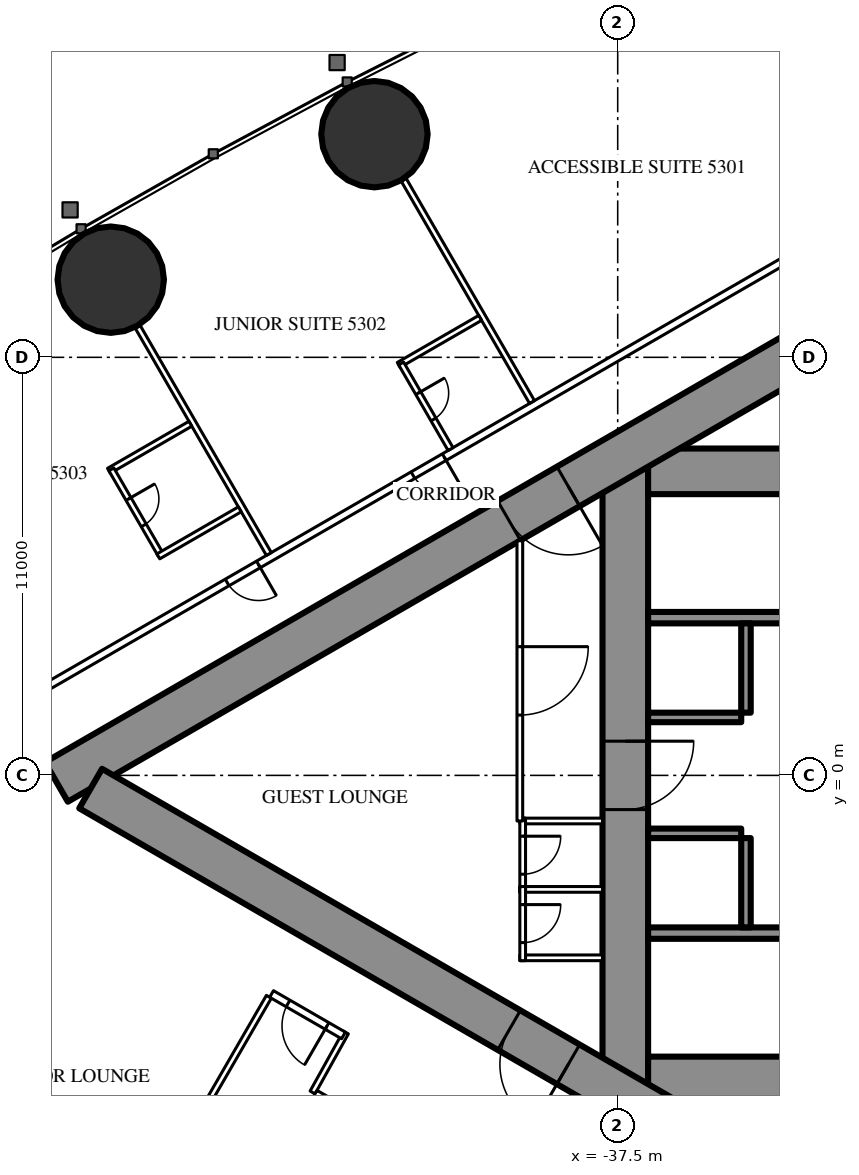
"""IFC4 building model, lengths in metres.
Left out: names, types, materials, properties, quantities, classifications, styles, units other than length and angle.
Written with IfcOpenShell. Run it as: python <this file> out.ifc"""

import sys

from ifc_helpers import new_model, si_unit, direction, frame, frame_2d, origin, origin_2d, place, context, subcontext, project, spatial, rectangle, circle, extrude, element, fill, save


model = new_model("IFC4")
c1 = context("Model", 3, precision=1e-05, world=origin(), true_north=direction((0.0, 1.0)))
c2 = subcontext(c1, "Body", "Model", "MODEL_VIEW")
j1 = project(units=[si_unit("LENGTHUNIT", "METRE"), si_unit("PLANEANGLEUNIT", "RADIAN")], contexts=[c1])
p1 = place(None, origin())
s1 = spatial("IfcSite", under=j1, at=p1, CompositionType="ELEMENT")
p2 = place(p1, origin())
s2 = spatial("IfcBuilding", under=s1, at=p2, CompositionType="ELEMENT")
p3 = place(p2, frame((0.0, 0.0, 198.3)))
s3 = spatial("IfcBuildingStorey", under=s2, at=p3, CompositionType="ELEMENT", Elevation=198.3)
for number, where, z_axis, x_axis in (
    (1, (-43.9, 16.871, 0.0), (0.0, 0.0, 1.0), (1.0, 0.0, 0.0)),
    (2, (-50.839, 13.043, 0.0), (0.0, 0.0, 1.0), (1.0, 0.0, 0.0)),
):
    element("IfcColumn", number, at=place(p3, frame(where, z_axis=z_axis, x_axis=x_axis)), inside=s3, PredefinedType="COLUMN", context=c2, shape_type="SweptSolid", body=[
        extrude(circle(Radius=1.4, at=origin_2d()), origin(), (0.0, 0.0, 1.0), 3.5),
    ])
p4 = place(p3, frame((-37.3, 8.6, 0.0), z_axis=(0.0, 0.0, 1.0), x_axis=(0.0, -1.0, 0.0)))
e3 = element("IfcWall", 3, at=p4, inside=s3, PredefinedType="SHEAR", context=c2, shape_type="SweptSolid", body=[
    extrude(rectangle(XDim=17.2, YDim=1.2, at=frame_2d((8.6, 0.0))), origin(), (0.0, 0.0, 1.0), 3.5),
])
p5 = place(p4, frame((7.7, 0.0, 0.0)))
e4 = element("IfcOpeningElement", 4, at=p5, cuts=e3, PredefinedType="OPENING", context=c2, shape_type="SweptSolid", body=[
    extrude(rectangle(XDim=1.8, YDim=2.2, at=frame_2d((0.9, 1.1))), frame((0.0, 0.61, 0.0), z_axis=(0.0, -1.0, 0.0), x_axis=(1.0, 0.0, 0.0)), (0.0, 0.0, 1.0), 1.22),
])
p6 = place(p3, frame((-28.3, 8.0, 0.0), z_axis=(0.0, 0.0, 1.0), x_axis=(-1.0, 0.0, 0.0)))
e5 = element("IfcWall", 5, at=p6, inside=s3, PredefinedType="SHEAR", context=c2, shape_type="SweptSolid", body=[
    extrude(rectangle(XDim=8.4, YDim=1.2, at=frame_2d((4.2, 0.0))), origin(), (0.0, 0.0, 1.0), 3.5),
])
p7 = place(p6, frame((0.25, 0.0, 0.0)))
e6 = element("IfcOpeningElement", 6, at=p7, cuts=e5, PredefinedType="OPENING", context=c2, shape_type="SweptSolid", body=[
    extrude(rectangle(XDim=1.0, YDim=2.2, at=frame_2d((0.5, 1.1))), frame((0.0, 0.61, 0.0), z_axis=(0.0, -1.0, 0.0), x_axis=(1.0, 0.0, 0.0)), (0.0, 0.0, 1.0), 1.22),
])
p8 = place(p3, frame((-28.3, -8.0, 0.0), z_axis=(0.0, 0.0, 1.0), x_axis=(-1.0, 0.0, 0.0)))
e7 = element("IfcWall", 7, at=p8, inside=s3, PredefinedType="SHEAR", context=c2, shape_type="SweptSolid", body=[
    extrude(rectangle(XDim=8.4, YDim=1.2, at=frame_2d((4.2, 0.0))), origin(), (0.0, 0.0, 1.0), 3.5),
])
p9 = place(p8, frame((0.25, 0.0, 0.0)))
e8 = element("IfcOpeningElement", 8, at=p9, cuts=e7, PredefinedType="OPENING", context=c2, shape_type="SweptSolid", body=[
    extrude(rectangle(XDim=1.0, YDim=2.2, at=frame_2d((0.5, 1.1))), frame((0.0, 0.61, 0.0), z_axis=(0.0, -1.0, 0.0), x_axis=(1.0, 0.0, 0.0)), (0.0, 0.0, 1.0), 1.22),
])
for number, where, z_axis, x_axis in (
    (9, (-28.3, 4.15, 0.0), (0.0, 0.0, 1.0), (-1.0, 0.0, 0.0)),
    (10, (-28.3, -4.15, 0.0), (0.0, 0.0, 1.0), (-1.0, 0.0, 0.0)),
):
    element("IfcWall", number, at=place(p3, frame(where, z_axis=z_axis, x_axis=x_axis)), inside=s3, PredefinedType="SHEAR", context=c2, shape_type="SweptSolid", body=[
        extrude(rectangle(XDim=8.4, YDim=0.3, at=frame_2d((4.2, 0.0))), origin(), (0.0, 0.0, 1.0), 3.5),
    ])
p10 = place(p3, frame((-34.125, 4.0, 0.0), z_axis=(0.0, 0.0, 1.0), x_axis=(0.0, -1.0, 0.0)))
e11 = element("IfcWall", 11, at=p10, inside=s3, PredefinedType="SHEAR", context=c2, shape_type="SweptSolid", body=[
    extrude(rectangle(XDim=2.35, YDim=0.25, at=frame_2d((1.175, 0.0))), origin(), (0.0, 0.0, 1.0), 3.5),
])
p11 = place(p3, frame((-34.25, 1.525, 0.0), z_axis=(0.0, 0.0, 1.0), x_axis=(-1.0, 0.0, 0.0)))
e12 = element("IfcWall", 12, at=p11, inside=s3, PredefinedType="SHEAR", context=c2, shape_type="SweptSolid", body=[
    extrude(rectangle(XDim=2.45, YDim=0.25, at=frame_2d((1.225, 0.0))), origin(), (0.0, 0.0, 1.0), 3.5),
])
p12 = place(p3, frame((-34.125, -1.65, 0.0), z_axis=(0.0, 0.0, 1.0), x_axis=(0.0, -1.0, 0.0)))
e13 = element("IfcWall", 13, at=p12, inside=s3, PredefinedType="SHEAR", context=c2, shape_type="SweptSolid", body=[
    extrude(rectangle(XDim=2.35, YDim=0.25, at=frame_2d((1.175, 0.0))), origin(), (0.0, 0.0, 1.0), 3.5),
])
p13 = place(p3, frame((-34.25, -1.525, 0.0), z_axis=(0.0, 0.0, 1.0), x_axis=(-1.0, 0.0, 0.0)))
e14 = element("IfcWall", 14, at=p13, inside=s3, PredefinedType="SHEAR", context=c2, shape_type="SweptSolid", body=[
    extrude(rectangle(XDim=2.45, YDim=0.25, at=frame_2d((1.225, 0.0))), origin(), (0.0, 0.0, 1.0), 3.5),
])
p14 = place(p3, frame((-27.2, 14.3, 0.0), z_axis=(0.0, 0.0, 1.0), x_axis=(-0.866026593062, -0.499997940104, 0.0)))
e15 = element("IfcWall", 15, at=p14, inside=s3, PredefinedType="SHEAR", context=c2, shape_type="SweptSolid", body=[
    extrude(rectangle(XDim=28.946, YDim=1.2, at=frame_2d((14.473, 0.0))), origin(), (0.0, 0.0, 1.0), 3.5),
])
p15 = place(p14, frame((4.6, 0.0, 0.0)))
e16 = element("IfcOpeningElement", 16, at=p15, cuts=e15, PredefinedType="OPENING", context=c2, shape_type="SweptSolid", body=[
    extrude(rectangle(XDim=1.0, YDim=2.2, at=frame_2d((0.5, 1.1))), frame((0.0, 0.61, 0.0), z_axis=(0.0, -1.0, 0.0), x_axis=(1.0, 0.0, 0.0)), (0.0, 0.0, 1.0), 1.22),
])
p16 = place(p14, frame((13.395, 0.0, 0.0)))
e17 = element("IfcOpeningElement", 17, at=p16, cuts=e15, PredefinedType="OPENING", context=c2, shape_type="SweptSolid", body=[
    extrude(rectangle(XDim=1.8, YDim=2.2, at=frame_2d((0.9, 1.1))), frame((0.0, 0.61, 0.0), z_axis=(0.0, -1.0, 0.0), x_axis=(1.0, 0.0, 0.0)), (0.0, 0.0, 1.0), 1.22),
])
p17 = place(p3, frame((-27.2, -14.3, 0.0), z_axis=(0.0, 0.0, 1.0), x_axis=(-0.866024021859, 0.500002393557, 0.0)))
e18 = element("IfcWall", 18, at=p17, inside=s3, PredefinedType="SHEAR", context=c2, shape_type="SweptSolid", body=[
    extrude(rectangle(XDim=27.907, YDim=1.2, at=frame_2d((13.954, 0.0))), origin(), (0.0, 0.0, 1.0), 3.5),
])
p18 = place(p17, frame((4.6, 0.0, 0.0)))
e19 = element("IfcOpeningElement", 19, at=p18, cuts=e18, PredefinedType="OPENING", context=c2, shape_type="SweptSolid", body=[
    extrude(rectangle(XDim=1.0, YDim=2.2, at=frame_2d((0.5, 1.1))), frame((0.0, 0.61, 0.0), z_axis=(0.0, -1.0, 0.0), x_axis=(1.0, 0.0, 0.0)), (0.0, 0.0, 1.0), 1.22),
])
p19 = place(p17, frame((13.395, 0.0, 0.0)))
e20 = element("IfcOpeningElement", 20, at=p19, cuts=e18, PredefinedType="OPENING", context=c2, shape_type="SweptSolid", body=[
    extrude(rectangle(XDim=1.8, YDim=2.2, at=frame_2d((0.9, 1.1))), frame((0.0, 0.61, 0.0), z_axis=(0.0, -1.0, 0.0), x_axis=(1.0, 0.0, 0.0)), (0.0, 0.0, 1.0), 1.22),
])
p20 = place(p3, frame((-27.86, 16.575, 0.0), z_axis=(0.0, 0.0, 1.0), x_axis=(-0.866025533911, -0.499999774615, 0.0)))
e21 = element("IfcWall", 21, at=p20, inside=s3, PredefinedType="PARTITIONING", context=c2, shape_type="SweptSolid", body=[
    extrude(rectangle(XDim=33.149, YDim=0.2, at=frame_2d((16.575, 0.0))), origin(), (0.0, 0.0, 1.0), 3.25),
])
p21 = place(p20, frame((3.75, 0.0, 0.0)))
e22 = element("IfcOpeningElement", 22, at=p21, cuts=e21, PredefinedType="OPENING", context=c2, shape_type="SweptSolid", body=[
    extrude(rectangle(XDim=1.0, YDim=2.2, at=frame_2d((0.5, 1.1))), frame((0.0, 0.11, 0.0), z_axis=(0.0, -1.0, 0.0), x_axis=(1.0, 0.0, 0.0)), (0.0, 0.0, 1.0), 0.22),
])
p22 = place(p20, frame((16.402, 0.0, 0.0)))
e23 = element("IfcOpeningElement", 23, at=p22, cuts=e21, PredefinedType="OPENING", context=c2, shape_type="SweptSolid", body=[
    extrude(rectangle(XDim=0.95, YDim=2.2, at=frame_2d((0.475, 1.1))), frame((0.0, 0.11, 0.0), z_axis=(0.0, -1.0, 0.0), x_axis=(1.0, 0.0, 0.0)), (0.0, 0.0, 1.0), 0.22),
])
p23 = place(p20, frame((22.047, 0.0, 0.0)))
e24 = element("IfcOpeningElement", 24, at=p23, cuts=e21, PredefinedType="OPENING", context=c2, shape_type="SweptSolid", body=[
    extrude(rectangle(XDim=0.95, YDim=2.2, at=frame_2d((0.475, 1.1))), frame((0.0, 0.11, 0.0), z_axis=(0.0, -1.0, 0.0), x_axis=(1.0, 0.0, 0.0)), (0.0, 0.0, 1.0), 0.22),
])
p24 = place(p20, frame((30.396, 0.0, 0.0)))
e25 = element("IfcOpeningElement", 25, at=p24, cuts=e21, PredefinedType="OPENING", context=c2, shape_type="SweptSolid", body=[
    extrude(rectangle(XDim=1.8, YDim=2.2, at=frame_2d((0.9, 1.1))), frame((0.0, 0.11, 0.0), z_axis=(0.0, -1.0, 0.0), x_axis=(1.0, 0.0, 0.0)), (0.0, 0.0, 1.0), 0.22),
])
p25 = place(p3, frame((-39.754, 9.823, 0.0), z_axis=(0.0, 0.0, 1.0), x_axis=(-0.499997670926, 0.866026748472, 0.0)))
e26 = element("IfcWall", 26, at=p25, inside=s3, PredefinedType="PARTITIONING", context=c2, shape_type="SweptSolid", body=[
    extrude(rectangle(XDim=6.757, YDim=0.15, at=frame_2d((3.379, 0.0))), origin(), (0.0, 0.0, 1.0), 2.3),
])
for number, where, z_axis, x_axis in (
    (27, (-46.679, 5.825, 0.0), (0.0, 0.0, 1.0), (-0.5, 0.866, 0.0)),
    (28, (-46.679, -5.825, 0.0), (0.0, 0.0, 1.0), (-0.5, -0.866, 0.0)),
):
    element("IfcWall", number, at=place(p3, frame(where, z_axis=z_axis, x_axis=x_axis)), inside=s3, PredefinedType="PARTITIONING", context=c2, shape_type="SweptSolid", body=[
        extrude(rectangle(XDim=6.911, YDim=0.15, at=frame_2d((3.456, 0.0))), origin(), (0.0, 0.0, 1.0), 2.3),
    ])
p26 = place(p3, frame((-44.652, -6.764, 0.0), z_axis=(0.0, 0.0, 1.0), x_axis=(-0.485424724123, -0.874278466629, 0.0)))
e29 = element("IfcWall", 29, at=p26, inside=s3, PredefinedType="PARTITIONING", context=c2, shape_type="SweptSolid", body=[
    extrude(rectangle(XDim=1.805, YDim=0.15, at=frame_2d((0.903, 0.0))), origin(), (0.0, 0.0, 1.0), 3.25),
])
p27 = place(p3, frame((-44.715, -6.844, 0.0), z_axis=(0.0, 0.0, 1.0), x_axis=(-0.865999496279, 0.500044870432, 0.0)))
e30 = element("IfcWall", 30, at=p27, inside=s3, PredefinedType="PARTITIONING", context=c2, shape_type="SweptSolid", body=[
    extrude(rectangle(XDim=2.185, YDim=0.2, at=frame_2d((1.092, 0.0))), origin(), (0.0, 0.0, 1.0), 3.25),
])
p28 = place(p27, frame((0.5, 0.0, 0.0)))
e31 = element("IfcOpeningElement", 31, at=p28, cuts=e30, PredefinedType="OPENING", context=c2, shape_type="SweptSolid", body=[
    extrude(rectangle(XDim=1.185, YDim=2.2, at=frame_2d((0.593, 1.1))), frame((0.0, 0.11, 0.0), z_axis=(0.0, -1.0, 0.0), x_axis=(1.0, 0.0, 0.0)), (0.0, 0.0, 1.0), 0.22),
])
p29 = place(p3, frame((-41.119, 12.037, 0.0), z_axis=(0.0, 0.0, 1.0), x_axis=(-0.866073894602, -0.499916002032, 0.0)))
e32 = element("IfcWall", 32, at=p29, inside=s3, PredefinedType="PARTITIONING", context=c2, shape_type="SweptSolid", body=[
    extrude(rectangle(XDim=2.475, YDim=0.15, at=frame_2d((1.238, 0.0))), origin(), (0.0, 0.0, 1.0), 3.25),
])
p30 = place(p3, frame((-41.898, 8.585, 0.0), z_axis=(0.0, 0.0, 1.0), x_axis=(-0.500006934395, 0.866021400173, 0.0)))
e33 = element("IfcWall", 33, at=p30, inside=s3, PredefinedType="PARTITIONING", context=c2, shape_type="SweptSolid", body=[
    extrude(rectangle(XDim=2.6, YDim=0.15, at=frame_2d((1.3, 0.0))), origin(), (0.0, 0.0, 1.0), 3.25),
])
p31 = place(p30, frame((0.9, 0.0, 0.0)))
e34 = element("IfcOpeningElement", 34, at=p31, cuts=e33, PredefinedType="OPENING", context=c2, shape_type="SweptSolid", body=[
    extrude(rectangle(XDim=0.8, YDim=2.2, at=frame_2d((0.4, 1.1))), frame((0.0, 0.085, 0.0), z_axis=(0.0, -1.0, 0.0), x_axis=(1.0, 0.0, 0.0)), (0.0, 0.0, 1.0), 0.17),
])
p32 = place(p3, frame((-48.744, 9.252, 0.0), z_axis=(0.0, 0.0, 1.0), x_axis=(-0.866006523861, -0.500032699561, 0.0)))
e35 = element("IfcWall", 35, at=p32, inside=s3, PredefinedType="PARTITIONING", context=c2, shape_type="SweptSolid", body=[
    extrude(rectangle(XDim=2.475, YDim=0.15, at=frame_2d((1.237, 0.0))), origin(), (0.0, 0.0, 1.0), 3.25),
])
p33 = place(p3, frame((-49.522, 5.8, 0.0), z_axis=(0.0, 0.0, 1.0), x_axis=(-0.500006934395, 0.866021400173, 0.0)))
e36 = element("IfcWall", 36, at=p33, inside=s3, PredefinedType="PARTITIONING", context=c2, shape_type="SweptSolid", body=[
    extrude(rectangle(XDim=2.6, YDim=0.15, at=frame_2d((1.3, 0.0))), origin(), (0.0, 0.0, 1.0), 3.25),
])
p34 = place(p33, frame((0.9, 0.0, 0.0)))
e37 = element("IfcOpeningElement", 37, at=p34, cuts=e36, PredefinedType="OPENING", context=c2, shape_type="SweptSolid", body=[
    extrude(rectangle(XDim=0.8, YDim=2.2, at=frame_2d((0.4, 1.1))), frame((0.0, 0.085, 0.0), z_axis=(0.0, -1.0, 0.0), x_axis=(1.0, 0.0, 0.0)), (0.0, 0.0, 1.0), 0.17),
])
p35 = place(p3, frame((-47.444, 7.0, 0.0), z_axis=(0.0, 0.0, 1.0), x_axis=(-0.866006523861, -0.500032699561, 0.0)))
e38 = element("IfcWall", 38, at=p35, inside=s3, PredefinedType="PARTITIONING", context=c2, shape_type="SweptSolid", body=[
    extrude(rectangle(XDim=2.475, YDim=0.15, at=frame_2d((1.237, 0.0))), origin(), (0.0, 0.0, 1.0), 3.25),
])
for number, where, z_axis, x_axis in (
    (39, (-37.9, -1.2, 0.0), (0.0, 0.0, 1.0), (-1.0, 0.0, 0.0)),
    (40, (-37.9, -3.0, 0.0), (0.0, 0.0, 1.0), (-1.0, 0.0, 0.0)),
    (41, (-37.9, -4.8, 0.0), (0.0, 0.0, 1.0), (-1.0, 0.0, 0.0)),
):
    element("IfcWall", number, at=place(p3, frame(where, z_axis=z_axis, x_axis=x_axis)), inside=s3, PredefinedType="PARTITIONING", context=c2, shape_type="SweptSolid", body=[
        extrude(rectangle(XDim=2.175, YDim=0.15, at=frame_2d((1.087, 0.0))), origin(), (0.0, 0.0, 1.0), 3.25),
    ])
p36 = place(p3, frame((-40.0, -1.125, 0.0), z_axis=(0.0, 0.0, 1.0), x_axis=(0.0, -1.0, 0.0)))
e42 = element("IfcWall", 42, at=p36, inside=s3, PredefinedType="PARTITIONING", context=c2, shape_type="SweptSolid", body=[
    extrude(rectangle(XDim=1.95, YDim=0.15, at=frame_2d((0.975, 0.0))), origin(), (0.0, 0.0, 1.0), 3.25),
])
p37 = place(p36, frame((0.475, 0.0, 0.0)))
e43 = element("IfcOpeningElement", 43, at=p37, cuts=e42, PredefinedType="OPENING", context=c2, shape_type="SweptSolid", body=[
    extrude(rectangle(XDim=1.0, YDim=2.2, at=frame_2d((0.5, 1.1))), frame((0.0, 0.085, 0.0), z_axis=(0.0, -1.0, 0.0), x_axis=(1.0, 0.0, 0.0)), (0.0, 0.0, 1.0), 0.17),
])
p38 = place(p3, frame((-40.0, -2.925, 0.0), z_axis=(0.0, 0.0, 1.0), x_axis=(0.0, -1.0, 0.0)))
e44 = element("IfcWall", 44, at=p38, inside=s3, PredefinedType="PARTITIONING", context=c2, shape_type="SweptSolid", body=[
    extrude(rectangle(XDim=1.95, YDim=0.15, at=frame_2d((0.975, 0.0))), origin(), (0.0, 0.0, 1.0), 3.25),
])
p39 = place(p38, frame((0.475, 0.0, 0.0)))
e45 = element("IfcOpeningElement", 45, at=p39, cuts=e44, PredefinedType="OPENING", context=c2, shape_type="SweptSolid", body=[
    extrude(rectangle(XDim=1.0, YDim=2.2, at=frame_2d((0.5, 1.1))), frame((0.0, 0.085, 0.0), z_axis=(0.0, -1.0, 0.0), x_axis=(1.0, 0.0, 0.0)), (0.0, 0.0, 1.0), 0.17),
])
p40 = place(p3, frame((-40.075, 6.174, 0.0), z_axis=(0.0, 0.0, 1.0), x_axis=(0.0, -1.0, 0.0)))
e46 = element("IfcWall", 46, at=p40, inside=s3, PredefinedType="PARTITIONING", context=c2, shape_type="SweptSolid", body=[
    extrude(rectangle(XDim=7.374, YDim=0.15, at=frame_2d((3.687, 0.0))), origin(), (0.0, 0.0, 1.0), 3.25),
])
p41 = place(p40, frame((2.787, 0.0, 0.0)))
e47 = element("IfcOpeningElement", 47, at=p41, cuts=e46, PredefinedType="OPENING", context=c2, shape_type="SweptSolid", body=[
    extrude(rectangle(XDim=1.8, YDim=2.2, at=frame_2d((0.9, 1.1))), frame((0.0, 0.085, 0.0), z_axis=(0.0, -1.0, 0.0), x_axis=(1.0, 0.0, 0.0)), (0.0, 0.0, 1.0), 0.17),
])
p42 = place(p3, frame((-39.758, -11.697, 0.0), z_axis=(0.0, 0.0, 1.0), x_axis=(-0.866024194504, 0.500002094529, 0.0)))
e48 = element("IfcWall", 48, at=p42, inside=s3, PredefinedType="PARTITIONING", context=c2, shape_type="SweptSolid", body=[
    extrude(rectangle(XDim=6.6, YDim=0.25, at=frame_2d((3.3, 0.0))), origin(), (0.0, 0.0, 1.0), 3.25),
])
p43 = place(p42, frame((0.75, 0.0, 0.0)))
e49 = element("IfcOpeningElement", 49, at=p43, cuts=e48, PredefinedType="OPENING", context=c2, shape_type="SweptSolid", body=[
    extrude(rectangle(XDim=1.1, YDim=2.2, at=frame_2d((0.55, 1.1))), frame((0.0, 0.135, 0.0), z_axis=(0.0, -1.0, 0.0), x_axis=(1.0, 0.0, 0.0)), (0.0, 0.0, 1.0), 0.27),
])
p44 = place(p42, frame((2.75, 0.0, 0.0)))
e50 = element("IfcOpeningElement", 50, at=p44, cuts=e48, PredefinedType="OPENING", context=c2, shape_type="SweptSolid", body=[
    extrude(rectangle(XDim=1.1, YDim=2.2, at=frame_2d((0.55, 1.1))), frame((0.0, 0.135, 0.0), z_axis=(0.0, -1.0, 0.0), x_axis=(1.0, 0.0, 0.0)), (0.0, 0.0, 1.0), 0.27),
])
p45 = place(p42, frame((4.75, 0.0, 0.0)))
e51 = element("IfcOpeningElement", 51, at=p45, cuts=e48, PredefinedType="OPENING", context=c2, shape_type="SweptSolid", body=[
    extrude(rectangle(XDim=1.1, YDim=2.2, at=frame_2d((0.55, 1.1))), frame((0.0, 0.135, 0.0), z_axis=(0.0, -1.0, 0.0), x_axis=(1.0, 0.0, 0.0)), (0.0, 0.0, 1.0), 0.27),
])
p46 = place(p31, origin())
e52 = element("IfcDoor", 52, at=p46, inside=s3, OperationType="SINGLE_SWING_RIGHT", PredefinedType="DOOR", context=c2, shape_type="SweptSolid", body=[
    extrude(rectangle(XDim=0.8, YDim=2.2, at=frame_2d((0.4, 1.1))), frame((0.0, 0.025, 0.0), z_axis=(0.0, -1.0, 0.0), x_axis=(1.0, 0.0, 0.0)), (0.0, 0.0, 1.0), 0.05),
])
fill(e34, e52)
p47 = place(p22, origin())
e53 = element("IfcDoor", 53, at=p47, inside=s3, OperationType="SINGLE_SWING_LEFT", PredefinedType="DOOR", context=c2, shape_type="SweptSolid", body=[
    extrude(rectangle(XDim=0.95, YDim=2.2, at=frame_2d((0.475, 1.1))), frame((0.0, 0.025, 0.0), z_axis=(0.0, -1.0, 0.0), x_axis=(1.0, 0.0, 0.0)), (0.0, 0.0, 1.0), 0.05),
])
fill(e23, e53)
p48 = place(p34, origin())
e54 = element("IfcDoor", 54, at=p48, inside=s3, OperationType="SINGLE_SWING_RIGHT", PredefinedType="DOOR", context=c2, shape_type="SweptSolid", body=[
    extrude(rectangle(XDim=0.8, YDim=2.2, at=frame_2d((0.4, 1.1))), frame((0.0, 0.025, 0.0), z_axis=(0.0, -1.0, 0.0), x_axis=(1.0, 0.0, 0.0)), (0.0, 0.0, 1.0), 0.05),
])
fill(e37, e54)
p49 = place(p23, origin())
e55 = element("IfcDoor", 55, at=p49, inside=s3, OperationType="SINGLE_SWING_LEFT", PredefinedType="DOOR", context=c2, shape_type="SweptSolid", body=[
    extrude(rectangle(XDim=0.95, YDim=2.2, at=frame_2d((0.475, 1.1))), frame((0.0, 0.025, 0.0), z_axis=(0.0, -1.0, 0.0), x_axis=(1.0, 0.0, 0.0)), (0.0, 0.0, 1.0), 0.05),
])
fill(e24, e55)
p50 = place(p28, origin())
e56 = element("IfcDoor", 56, at=p50, inside=s3, OperationType="SINGLE_SWING_LEFT", PredefinedType="DOOR", context=c2, shape_type="SweptSolid", body=[
    extrude(rectangle(XDim=1.185, YDim=2.2, at=frame_2d((0.593, 1.1))), frame((0.0, 0.025, 0.0), z_axis=(0.0, -1.0, 0.0), x_axis=(1.0, 0.0, 0.0)), (0.0, 0.0, 1.0), 0.05),
])
fill(e31, e56)
p51 = place(p37, origin())
e57 = element("IfcDoor", 57, at=p51, inside=s3, OperationType="SINGLE_SWING_LEFT", PredefinedType="DOOR", context=c2, shape_type="SweptSolid", body=[
    extrude(rectangle(XDim=1.0, YDim=2.2, at=frame_2d((0.5, 1.1))), frame((0.0, 0.025, 0.0), z_axis=(0.0, -1.0, 0.0), x_axis=(1.0, 0.0, 0.0)), (0.0, 0.0, 1.0), 0.05),
])
fill(e43, e57)
p52 = place(p39, origin())
e58 = element("IfcDoor", 58, at=p52, inside=s3, OperationType="SINGLE_SWING_LEFT", PredefinedType="DOOR", context=c2, shape_type="SweptSolid", body=[
    extrude(rectangle(XDim=1.0, YDim=2.2, at=frame_2d((0.5, 1.1))), frame((0.0, 0.025, 0.0), z_axis=(0.0, -1.0, 0.0), x_axis=(1.0, 0.0, 0.0)), (0.0, 0.0, 1.0), 0.05),
])
fill(e45, e58)
p53 = place(p41, origin())
e59 = element("IfcDoor", 59, at=p53, inside=s3, OperationType="DOUBLE_DOOR_SINGLE_SWING", PredefinedType="DOOR", context=c2, shape_type="SweptSolid", body=[
    extrude(rectangle(XDim=1.8, YDim=2.2, at=frame_2d((0.9, 1.1))), frame((0.0, 0.025, 0.0), z_axis=(0.0, -1.0, 0.0), x_axis=(1.0, 0.0, 0.0)), (0.0, 0.0, 1.0), 0.05),
])
fill(e47, e59)
p54 = place(p16, origin())
e60 = element("IfcDoor", 60, at=p54, inside=s3, OperationType="DOUBLE_DOOR_SINGLE_SWING", PredefinedType="DOOR", context=c2, shape_type="SweptSolid", body=[
    extrude(rectangle(XDim=1.8, YDim=2.2, at=frame_2d((0.9, 1.1))), frame((0.0, 0.025, 0.0), z_axis=(0.0, -1.0, 0.0), x_axis=(1.0, 0.0, 0.0)), (0.0, 0.0, 1.0), 0.05),
])
fill(e17, e60)
p55 = place(p19, origin())
e61 = element("IfcDoor", 61, at=p55, inside=s3, OperationType="DOUBLE_DOOR_SINGLE_SWING", PredefinedType="DOOR", context=c2, shape_type="SweptSolid", body=[
    extrude(rectangle(XDim=1.8, YDim=2.2, at=frame_2d((0.9, 1.1))), frame((0.0, 0.025, 0.0), z_axis=(0.0, -1.0, 0.0), x_axis=(1.0, 0.0, 0.0)), (0.0, 0.0, 1.0), 0.05),
])
fill(e20, e61)
p56 = place(p5, origin())
e62 = element("IfcDoor", 62, at=p56, inside=s3, OperationType="DOUBLE_DOOR_SINGLE_SWING", PredefinedType="DOOR", context=c2, shape_type="SweptSolid", body=[
    extrude(rectangle(XDim=1.8, YDim=2.2, at=frame_2d((0.9, 1.1))), frame((0.0, 0.025, 0.0), z_axis=(0.0, -1.0, 0.0), x_axis=(1.0, 0.0, 0.0)), (0.0, 0.0, 1.0), 0.05),
])
fill(e4, e62)
save(model, sys.argv[1])
